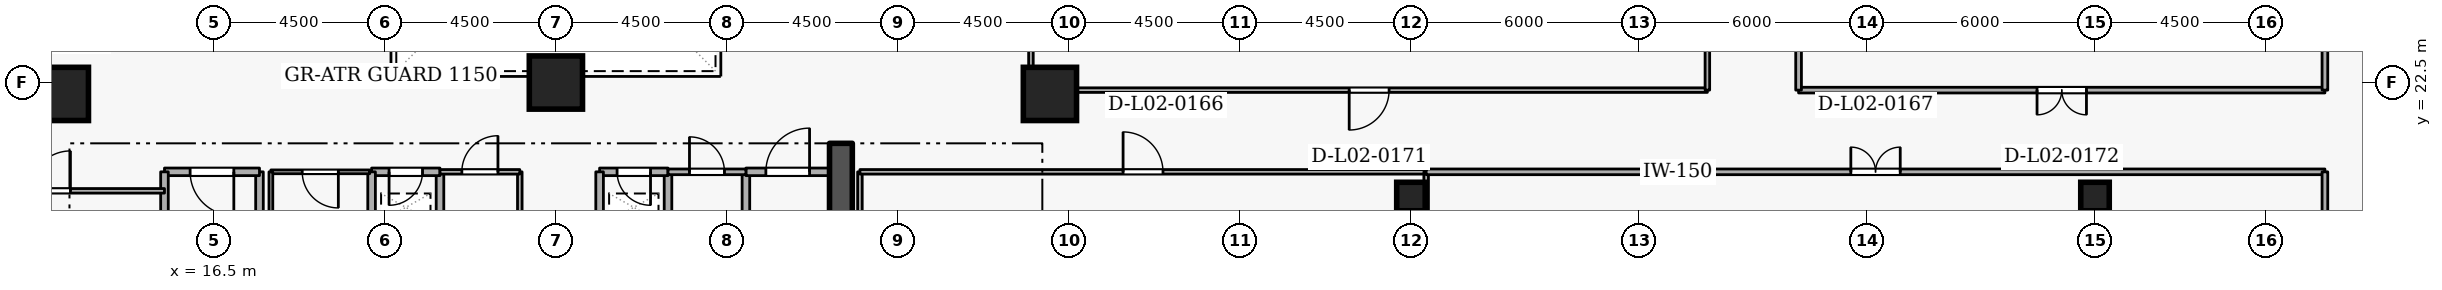
"""IFC4 building model, lengths in metres.
Left out: names, types, materials, properties, quantities, classifications, styles, units other than length and angle.
Written with IfcOpenShell. Run it as: python <this file> out.ifc"""

import sys

from ifc_helpers import new_model, si_unit, direction, frame, frame_2d, origin, origin_2d, place, context, subcontext, project, spatial, rectangle, extrude, element, fill, save


model = new_model("IFC4")
c1 = context("Model", 3, precision=1e-05, world=origin(), true_north=direction((0.0, 1.0)))
c2 = subcontext(c1, "Body", "Model", "MODEL_VIEW")
j1 = project(units=[si_unit("LENGTHUNIT", "METRE"), si_unit("PLANEANGLEUNIT", "RADIAN")], contexts=[c1])
p1 = place(None, origin())
s1 = spatial("IfcSite", under=j1, at=p1, CompositionType="ELEMENT")
p2 = place(p1, origin())
s2 = spatial("IfcBuilding", under=s1, at=p2, CompositionType="ELEMENT")
p3 = place(p2, frame((0.0, 0.0, 9.6)))
s3 = spatial("IfcBuildingStorey", under=s2, at=p3, CompositionType="ELEMENT", Elevation=9.6)
p4 = place(p3, frame((33.0, 15.2, 0.0), z_axis=(0.0, 0.0, 1.0), x_axis=(0.0, 1.0, 0.0)))
e1 = element("IfcWall", 1, at=p4, inside=s3, PredefinedType="SHEAR", context=c2, shape_type="SweptSolid", body=[
    extrude(rectangle(XDim=5.7, YDim=0.6, at=frame_2d((2.85, 0.0))), origin(), (0.0, 0.0, 1.0), 4.5),
])
for number, where, z_axis, x_axis in (
    (2, (12.5, 22.2, 0.0), (0.0, 0.0, 1.0), (1.0, 0.0, 0.0)),
    (3, (38.5, 22.2, 0.0), (0.0, 0.0, 1.0), (1.0, 0.0, 0.0)),
    (4, (25.5, 22.5, 0.0), (0.0, 0.0, 1.0), (1.0, 0.0, 0.0)),
):
    element("IfcColumn", number, at=place(p3, frame(where, z_axis=z_axis, x_axis=x_axis)), inside=s3, PredefinedType="COLUMN", context=c2, shape_type="SweptSolid", body=[
        extrude(rectangle(XDim=1.4, YDim=1.4, at=origin_2d()), origin(), (0.0, 0.0, 1.0), 4.5),
    ])
for number, where, z_axis, x_axis in (
    (5, (48.0, 19.5, 0.0), (0.0, 0.0, 1.0), (1.0, 0.0, 0.0)),
    (6, (66.0, 19.5, 0.0), (0.0, 0.0, 1.0), (1.0, 0.0, 0.0)),
):
    element("IfcColumn", number, at=place(p3, frame(where, z_axis=z_axis, x_axis=x_axis)), inside=s3, PredefinedType="COLUMN", context=c2, shape_type="SweptSolid", body=[
        extrude(rectangle(XDim=0.75, YDim=0.75, at=origin_2d()), origin(), (0.0, 0.0, 1.0), 4.5),
    ])
p5 = place(p3, frame((17.7, 18.4, 0.0), z_axis=(0.0, 0.0, 1.0), x_axis=(0.0, 1.0, 0.0)))
e7 = element("IfcWall", 7, at=p5, inside=s3, PredefinedType="STANDARD", context=c2, shape_type="SweptSolid", body=[
    extrude(rectangle(XDim=1.75, YDim=0.2, at=frame_2d((0.875, 0.0))), origin(), (0.0, 0.0, 1.0), 3.365),
])
p6 = place(p3, frame((17.7, 20.15, 0.0), z_axis=(0.0, 0.0, 1.0), x_axis=(-1.0, 0.0, 0.0)))
e8 = element("IfcWall", 8, at=p6, inside=s3, PredefinedType="STANDARD", context=c2, shape_type="SweptSolid", body=[
    extrude(rectangle(XDim=2.5, YDim=0.2, at=frame_2d((1.25, 0.0))), origin(), (0.0, 0.0, 1.0), 4.16),
])
p7 = place(p6, frame((0.675, 0.0, 0.0)))
e9 = element("IfcOpeningElement", 9, at=p7, cuts=e8, PredefinedType="OPENING", context=c2, shape_type="SweptSolid", body=[
    extrude(rectangle(XDim=1.15, YDim=2.1, at=frame_2d((0.575, 1.05))), frame((0.0, 0.11, 0.0), z_axis=(0.0, -1.0, 0.0), x_axis=(1.0, 0.0, 0.0)), (0.0, 0.0, 1.0), 0.22),
])
p8 = place(p3, frame((15.2, 20.15, 0.0), z_axis=(0.0, 0.0, 1.0), x_axis=(0.0, -1.0, 0.0)))
e10 = element("IfcWall", 10, at=p8, inside=s3, PredefinedType="STANDARD", context=c2, shape_type="SweptSolid", body=[
    extrude(rectangle(XDim=5.15, YDim=0.2, at=frame_2d((2.575, 0.0))), origin(), (0.0, 0.0, 1.0), 4.16),
])
p9 = place(p3, frame((28.45, 18.65, 0.0), z_axis=(0.0, 0.0, 1.0), x_axis=(0.0, 1.0, 0.0)))
e11 = element("IfcWall", 11, at=p9, inside=s3, PredefinedType="STANDARD", context=c2, shape_type="SweptSolid", body=[
    extrude(rectangle(XDim=1.5, YDim=0.2, at=frame_2d((0.75, 0.0))), origin(), (0.0, 0.0, 1.0), 4.16),
])
p10 = place(p3, frame((28.45, 20.15, 0.0), z_axis=(0.0, 0.0, 1.0), x_axis=(-1.0, 0.0, 0.0)))
e12 = element("IfcWall", 12, at=p10, inside=s3, PredefinedType="STANDARD", context=c2, shape_type="SweptSolid", body=[
    extrude(rectangle(XDim=1.8, YDim=0.2, at=frame_2d((0.9, 0.0))), origin(), (0.0, 0.0, 1.0), 4.16),
])
p11 = place(p10, frame((0.46, 0.0, 0.0)))
e13 = element("IfcOpeningElement", 13, at=p11, cuts=e12, PredefinedType="OPENING", context=c2, shape_type="SweptSolid", body=[
    extrude(rectangle(XDim=0.88, YDim=2.04, at=frame_2d((0.44, 1.02))), frame((0.0, 0.11, 0.0), z_axis=(0.0, -1.0, 0.0), x_axis=(1.0, 0.0, 0.0)), (0.0, 0.0, 1.0), 0.22),
])
for number, where, z_axis, x_axis in (
    (14, (26.65, 20.15, 0.0), (0.0, 0.0, 1.0), (0.0, -1.0, 0.0)),
    (15, (22.45, 18.65, 0.0), (0.0, 0.0, 1.0), (0.0, 1.0, 0.0)),
):
    element("IfcWall", number, at=place(p3, frame(where, z_axis=z_axis, x_axis=x_axis)), inside=s3, PredefinedType="STANDARD", context=c2, shape_type="SweptSolid", body=[
        extrude(rectangle(XDim=1.5, YDim=0.2, at=frame_2d((0.75, 0.0))), origin(), (0.0, 0.0, 1.0), 4.16),
    ])
p12 = place(p3, frame((22.45, 20.15, 0.0), z_axis=(0.0, 0.0, 1.0), x_axis=(-1.0, 0.0, 0.0)))
e16 = element("IfcWall", 16, at=p12, inside=s3, PredefinedType="STANDARD", context=c2, shape_type="SweptSolid", body=[
    extrude(rectangle(XDim=1.8, YDim=0.2, at=frame_2d((0.9, 0.0))), origin(), (0.0, 0.0, 1.0), 4.16),
])
p13 = place(p12, frame((0.46, 0.0, 0.0)))
e17 = element("IfcOpeningElement", 17, at=p13, cuts=e16, PredefinedType="OPENING", context=c2, shape_type="SweptSolid", body=[
    extrude(rectangle(XDim=0.88, YDim=2.04, at=frame_2d((0.44, 1.02))), frame((0.0, 0.11, 0.0), z_axis=(0.0, -1.0, 0.0), x_axis=(1.0, 0.0, 0.0)), (0.0, 0.0, 1.0), 0.22),
])
for number, where, z_axis, x_axis in (
    (18, (20.65, 20.15, 0.0), (0.0, 0.0, 1.0), (0.0, -1.0, 0.0)),
    (19, (30.5, 18.65, 0.0), (0.0, 0.0, 1.0), (0.0, 1.0, 0.0)),
):
    element("IfcWall", number, at=place(p3, frame(where, z_axis=z_axis, x_axis=x_axis)), inside=s3, PredefinedType="STANDARD", context=c2, shape_type="SweptSolid", body=[
        extrude(rectangle(XDim=1.5, YDim=0.2, at=frame_2d((0.75, 0.0))), origin(), (0.0, 0.0, 1.0), 4.16),
    ])
p14 = place(p3, frame((30.5, 20.15, 0.0), z_axis=(0.0, 0.0, 1.0), x_axis=(1.0, 0.0, 0.0)))
e20 = element("IfcWall", 20, at=p14, inside=s3, PredefinedType="STANDARD", context=c2, shape_type="SweptSolid", body=[
    extrude(rectangle(XDim=2.2, YDim=0.2, at=frame_2d((1.1, 0.0))), origin(), (0.0, 0.0, 1.0), 4.16),
])
p15 = place(p14, frame((0.525, 0.0, 0.0)))
e21 = element("IfcOpeningElement", 21, at=p15, cuts=e20, PredefinedType="OPENING", context=c2, shape_type="SweptSolid", body=[
    extrude(rectangle(XDim=1.15, YDim=2.1, at=frame_2d((0.575, 1.05))), frame((0.0, 0.11, 0.0), z_axis=(0.0, -1.0, 0.0), x_axis=(1.0, 0.0, 0.0)), (0.0, 0.0, 1.0), 0.22),
])
p16 = place(p3, frame((20.6, 20.15, 0.0), z_axis=(0.0, 0.0, 1.0), x_axis=(-1.0, 0.0, 0.0)))
e22 = element("IfcWall", 22, at=p16, inside=s3, PredefinedType="PARTITIONING", context=c2, shape_type="SweptSolid", body=[
    extrude(rectangle(XDim=2.6, YDim=0.1, at=frame_2d((1.3, 0.0))), origin(), (0.0, 0.0, 1.0), 4.16),
])
p17 = place(p16, frame((0.825, 0.0, 0.0)))
e23 = element("IfcOpeningElement", 23, at=p17, cuts=e22, PredefinedType="OPENING", context=c2, shape_type="SweptSolid", body=[
    extrude(rectangle(XDim=0.95, YDim=2.1, at=frame_2d((0.475, 1.05))), frame((0.0, 0.06, 0.0), z_axis=(0.0, -1.0, 0.0), x_axis=(1.0, 0.0, 0.0)), (0.0, 0.0, 1.0), 0.12),
])
p18 = place(p3, frame((18.0, 20.15, 0.0), z_axis=(0.0, 0.0, 1.0), x_axis=(0.0, -1.0, 0.0)))
e24 = element("IfcWall", 24, at=p18, inside=s3, PredefinedType="PARTITIONING", context=c2, shape_type="SweptSolid", body=[
    extrude(rectangle(XDim=1.5, YDim=0.1, at=frame_2d((0.75, 0.0))), origin(), (0.0, 0.0, 1.0), 3.365),
])
p19 = place(p3, frame((24.55, 20.15, 0.0), z_axis=(0.0, 0.0, 1.0), x_axis=(0.0, -1.0, 0.0)))
e25 = element("IfcWall", 25, at=p19, inside=s3, PredefinedType="PARTITIONING", context=c2, shape_type="SweptSolid", body=[
    extrude(rectangle(XDim=1.5, YDim=0.12, at=frame_2d((0.75, 0.0))), origin(), (0.0, 0.0, 1.0), 4.16),
])
p20 = place(p3, frame((22.45, 20.15, 0.0), z_axis=(0.0, 0.0, 1.0), x_axis=(1.0, 0.0, 0.0)))
e26 = element("IfcWall", 26, at=p20, inside=s3, PredefinedType="PARTITIONING", context=c2, shape_type="SweptSolid", body=[
    extrude(rectangle(XDim=2.1, YDim=0.12, at=frame_2d((1.05, 0.0))), origin(), (0.0, 0.0, 1.0), 4.16),
])
p21 = place(p20, frame((0.575, 0.0, 0.0)))
e27 = element("IfcOpeningElement", 27, at=p21, cuts=e26, PredefinedType="OPENING", context=c2, shape_type="SweptSolid", body=[
    extrude(rectangle(XDim=0.95, YDim=2.1, at=frame_2d((0.475, 1.05))), frame((0.0, 0.07, 0.0), z_axis=(0.0, -1.0, 0.0), x_axis=(1.0, 0.0, 0.0)), (0.0, 0.0, 1.0), 0.14),
])
p22 = place(p3, frame((28.45, 20.15, 0.0), z_axis=(0.0, 0.0, 1.0), x_axis=(1.0, 0.0, 0.0)))
e28 = element("IfcWall", 28, at=p22, inside=s3, PredefinedType="PARTITIONING", context=c2, shape_type="SweptSolid", body=[
    extrude(rectangle(XDim=2.05, YDim=0.15, at=frame_2d((1.025, 0.0))), origin(), (0.0, 0.0, 1.0), 4.16),
])
p23 = place(p22, frame((0.565, 0.0, 0.0)))
e29 = element("IfcOpeningElement", 29, at=p23, cuts=e28, PredefinedType="OPENING", context=c2, shape_type="SweptSolid", body=[
    extrude(rectangle(XDim=0.92, YDim=2.08, at=frame_2d((0.46, 1.04))), frame((0.0, 0.085, 0.0), z_axis=(0.0, -1.0, 0.0), x_axis=(1.0, 0.0, 0.0)), (0.0, 0.0, 1.0), 0.17),
])
p24 = place(p3, frame((9.2, 19.65, 0.0), z_axis=(0.0, 0.0, 1.0), x_axis=(1.0, 0.0, 0.0)))
e30 = element("IfcWall", 30, at=p24, inside=s3, PredefinedType="PARTITIONING", context=c2, shape_type="SweptSolid", body=[
    extrude(rectangle(XDim=6.0, YDim=0.12, at=frame_2d((3.0, 0.0))), origin(), (0.0, 0.0, 1.0), 4.16),
])
p25 = place(p24, frame((2.475, 0.0, 0.0)))
e31 = element("IfcOpeningElement", 31, at=p25, cuts=e30, PredefinedType="OPENING", context=c2, shape_type="SweptSolid", body=[
    extrude(rectangle(XDim=1.05, YDim=2.1, at=frame_2d((0.525, 1.05))), frame((0.0, 0.07, 0.0), z_axis=(0.0, -1.0, 0.0), x_axis=(1.0, 0.0, 0.0)), (0.0, 0.0, 1.0), 0.14),
])
p26 = place(p3, frame((33.5, 17.648, 0.0), z_axis=(0.0, 0.0, 1.0), x_axis=(0.0, 1.0, 0.0)))
e32 = element("IfcWall", 32, at=p26, inside=s3, PredefinedType="PARTITIONING", context=c2, shape_type="SweptSolid", body=[
    extrude(rectangle(XDim=2.502, YDim=0.12, at=frame_2d((1.251, 0.0))), origin(), (0.0, 0.0, 1.0), 4.16),
])
p27 = place(p3, frame((33.5, 20.15, 0.0), z_axis=(0.0, 0.0, 1.0), x_axis=(1.0, 0.0, 0.0)))
e33 = element("IfcWall", 33, at=p27, inside=s3, PredefinedType="PARTITIONING", context=c2, shape_type="SweptSolid", body=[
    extrude(rectangle(XDim=14.9, YDim=0.12, at=frame_2d((7.45, 0.0))), origin(), (0.0, 0.0, 1.0), 4.16),
])
p28 = place(p27, frame((6.925, 0.0, 0.0)))
e34 = element("IfcOpeningElement", 34, at=p28, cuts=e33, PredefinedType="OPENING", context=c2, shape_type="SweptSolid", body=[
    extrude(rectangle(XDim=1.05, YDim=2.1, at=frame_2d((0.525, 1.05))), frame((0.0, 0.07, 0.0), z_axis=(0.0, -1.0, 0.0), x_axis=(1.0, 0.0, 0.0)), (0.0, 0.0, 1.0), 0.14),
])
p29 = place(p3, frame((48.4, 20.15, 0.0), z_axis=(0.0, 0.0, 1.0), x_axis=(0.0, -1.0, 0.0)))
e35 = element("IfcWall", 35, at=p29, inside=s3, PredefinedType="PARTITIONING", context=c2, shape_type="SweptSolid", body=[
    extrude(rectangle(XDim=12.33, YDim=0.12, at=frame_2d((6.165, 0.0))), origin(), (0.0, 0.0, 1.0), 4.16),
])
p30 = place(p3, frame((48.4, 20.15, 0.0), z_axis=(0.0, 0.0, 1.0), x_axis=(1.0, 0.0, 0.0)))
e36 = element("IfcWall", 36, at=p30, inside=s3, PredefinedType="PARTITIONING", context=c2, shape_type="SweptSolid", body=[
    extrude(rectangle(XDim=23.65, YDim=0.15, at=frame_2d((11.825, 0.0))), origin(), (0.0, 0.0, 1.0), 4.16),
])
p31 = place(p30, frame((11.175, 0.0, 0.0)))
e37 = element("IfcOpeningElement", 37, at=p31, cuts=e36, PredefinedType="OPENING", context=c2, shape_type="SweptSolid", body=[
    extrude(rectangle(XDim=1.3, YDim=2.12, at=frame_2d((0.65, 1.06))), frame((0.0, 0.085, 0.0), z_axis=(0.0, -1.0, 0.0), x_axis=(1.0, 0.0, 0.0)), (0.0, 0.0, 1.0), 0.17),
])
p32 = place(p3, frame((72.05, 20.15, 0.0), z_axis=(0.0, 0.0, 1.0), x_axis=(0.0, -1.0, 0.0)))
e38 = element("IfcWall", 38, at=p32, inside=s3, PredefinedType="PARTITIONING", context=c2, shape_type="SweptSolid", body=[
    extrude(rectangle(XDim=5.35, YDim=0.15, at=frame_2d((2.675, 0.0))), origin(), (0.0, 0.0, 1.0), 4.16),
])
p33 = place(p3, frame((55.8, 22.3, 0.0), z_axis=(0.0, 0.0, 1.0), x_axis=(-1.0, 0.0, 0.0)))
e39 = element("IfcWall", 39, at=p33, inside=s3, PredefinedType="PARTITIONING", context=c2, shape_type="SweptSolid", body=[
    extrude(rectangle(XDim=17.8, YDim=0.12, at=frame_2d((8.9, 0.0))), origin(), (0.0, 0.0, 1.0), 4.16),
])
p34 = place(p33, frame((8.375, 0.0, 0.0)))
e40 = element("IfcOpeningElement", 40, at=p34, cuts=e39, PredefinedType="OPENING", context=c2, shape_type="SweptSolid", body=[
    extrude(rectangle(XDim=1.05, YDim=2.1, at=frame_2d((0.525, 1.05))), frame((0.0, 0.07, 0.0), z_axis=(0.0, -1.0, 0.0), x_axis=(1.0, 0.0, 0.0)), (0.0, 0.0, 1.0), 0.14),
])
for number, where, z_axis, x_axis in (
    (41, (38.0, 22.3, 0.0), (0.0, 0.0, 1.0), (0.0, 1.0, 0.0)),
    (42, (55.8, 32.28, 0.0), (0.0, 0.0, 1.0), (0.0, -1.0, 0.0)),
):
    element("IfcWall", number, at=place(p3, frame(where, z_axis=z_axis, x_axis=x_axis)), inside=s3, PredefinedType="PARTITIONING", context=c2, shape_type="SweptSolid", body=[
        extrude(rectangle(XDim=9.98, YDim=0.12, at=frame_2d((4.99, 0.0))), origin(), (0.0, 0.0, 1.0), 4.16),
    ])
p35 = place(p3, frame((72.05, 22.3, 0.0), z_axis=(0.0, 0.0, 1.0), x_axis=(-1.0, 0.0, 0.0)))
e43 = element("IfcWall", 43, at=p35, inside=s3, PredefinedType="PARTITIONING", context=c2, shape_type="SweptSolid", body=[
    extrude(rectangle(XDim=13.85, YDim=0.15, at=frame_2d((6.925, 0.0))), origin(), (0.0, 0.0, 1.0), 4.16),
])
p36 = place(p35, frame((6.275, 0.0, 0.0)))
e44 = element("IfcOpeningElement", 44, at=p36, cuts=e43, PredefinedType="OPENING", context=c2, shape_type="SweptSolid", body=[
    extrude(rectangle(XDim=1.3, YDim=2.12, at=frame_2d((0.65, 1.06))), frame((0.0, 0.085, 0.0), z_axis=(0.0, -1.0, 0.0), x_axis=(1.0, 0.0, 0.0)), (0.0, 0.0, 1.0), 0.17),
])
for number, where, z_axis, x_axis in (
    (45, (58.2, 22.3, 0.0), (0.0, 0.0, 1.0), (0.0, 1.0, 0.0)),
    (46, (72.05, 32.28, 0.0), (0.0, 0.0, 1.0), (0.0, -1.0, 0.0)),
):
    element("IfcWall", number, at=place(p3, frame(where, z_axis=z_axis, x_axis=x_axis)), inside=s3, PredefinedType="PARTITIONING", context=c2, shape_type="SweptSolid", body=[
        extrude(rectangle(XDim=9.98, YDim=0.15, at=frame_2d((4.99, 0.0))), origin(), (0.0, 0.0, 1.0), 4.16),
    ])
p37 = place(p7, origin())
e47 = element("IfcDoor", 47, at=p37, inside=s3, OperationType="SINGLE_SWING_LEFT", PredefinedType="DOOR", context=c2, shape_type="SweptSolid", body=[
    extrude(rectangle(XDim=1.15, YDim=2.1, at=frame_2d((0.575, 1.05))), frame((0.0, 0.025, 0.0), z_axis=(0.0, -1.0, 0.0), x_axis=(1.0, 0.0, 0.0)), (0.0, 0.0, 1.0), 0.05),
])
fill(e9, e47)
p38 = place(p11, origin())
e48 = element("IfcDoor", 48, at=p38, inside=s3, OperationType="SINGLE_SWING_LEFT", PredefinedType="DOOR", context=c2, shape_type="SweptSolid", body=[
    extrude(rectangle(XDim=0.88, YDim=2.04, at=frame_2d((0.44, 1.02))), frame((0.0, 0.025, 0.0), z_axis=(0.0, -1.0, 0.0), x_axis=(1.0, 0.0, 0.0)), (0.0, 0.0, 1.0), 0.05),
])
fill(e13, e48)
p39 = place(p13, origin())
e49 = element("IfcDoor", 49, at=p39, inside=s3, OperationType="SINGLE_SWING_RIGHT", PredefinedType="DOOR", context=c2, shape_type="SweptSolid", body=[
    extrude(rectangle(XDim=0.88, YDim=2.04, at=frame_2d((0.44, 1.02))), frame((0.0, 0.025, 0.0), z_axis=(0.0, -1.0, 0.0), x_axis=(1.0, 0.0, 0.0)), (0.0, 0.0, 1.0), 0.05),
])
fill(e17, e49)
p40 = place(p17, origin())
e50 = element("IfcDoor", 50, at=p40, inside=s3, OperationType="SINGLE_SWING_LEFT", PredefinedType="DOOR", context=c2, shape_type="SweptSolid", body=[
    extrude(rectangle(XDim=0.95, YDim=2.1, at=frame_2d((0.475, 1.05))), frame((0.0, 0.025, 0.0), z_axis=(0.0, -1.0, 0.0), x_axis=(1.0, 0.0, 0.0)), (0.0, 0.0, 1.0), 0.05),
])
fill(e23, e50)
p41 = place(p21, origin())
e51 = element("IfcDoor", 51, at=p41, inside=s3, OperationType="SINGLE_SWING_RIGHT", PredefinedType="DOOR", context=c2, shape_type="SweptSolid", body=[
    extrude(rectangle(XDim=0.95, YDim=2.1, at=frame_2d((0.475, 1.05))), frame((0.0, 0.025, 0.0), z_axis=(0.0, -1.0, 0.0), x_axis=(1.0, 0.0, 0.0)), (0.0, 0.0, 1.0), 0.05),
])
fill(e27, e51)
p42 = place(p23, origin())
e52 = element("IfcDoor", 52, at=p42, inside=s3, OperationType="SINGLE_SWING_LEFT", PredefinedType="DOOR", context=c2, shape_type="SweptSolid", body=[
    extrude(rectangle(XDim=0.92, YDim=2.08, at=frame_2d((0.46, 1.04))), frame((0.0, 0.025, 0.0), z_axis=(0.0, -1.0, 0.0), x_axis=(1.0, 0.0, 0.0)), (0.0, 0.0, 1.0), 0.05),
])
fill(e29, e52)
p43 = place(p15, origin())
e53 = element("IfcDoor", 53, at=p43, inside=s3, OperationType="SINGLE_SWING_RIGHT", PredefinedType="DOOR", context=c2, shape_type="SweptSolid", body=[
    extrude(rectangle(XDim=1.15, YDim=2.1, at=frame_2d((0.575, 1.05))), frame((0.0, 0.025, 0.0), z_axis=(0.0, -1.0, 0.0), x_axis=(1.0, 0.0, 0.0)), (0.0, 0.0, 1.0), 0.05),
])
fill(e21, e53)
p44 = place(p25, origin())
e54 = element("IfcDoor", 54, at=p44, inside=s3, OperationType="SINGLE_SWING_RIGHT", PredefinedType="DOOR", context=c2, shape_type="SweptSolid", body=[
    extrude(rectangle(XDim=1.05, YDim=2.1, at=frame_2d((0.525, 1.05))), frame((0.0, 0.025, 0.0), z_axis=(0.0, -1.0, 0.0), x_axis=(1.0, 0.0, 0.0)), (0.0, 0.0, 1.0), 0.05),
])
fill(e31, e54)
p45 = place(p28, origin())
e55 = element("IfcDoor", 55, at=p45, inside=s3, OperationType="SINGLE_SWING_LEFT", PredefinedType="DOOR", context=c2, shape_type="SweptSolid", body=[
    extrude(rectangle(XDim=1.05, YDim=2.1, at=frame_2d((0.525, 1.05))), frame((0.0, 0.025, 0.0), z_axis=(0.0, -1.0, 0.0), x_axis=(1.0, 0.0, 0.0)), (0.0, 0.0, 1.0), 0.05),
])
fill(e34, e55)
p46 = place(p31, origin())
e56 = element("IfcDoor", 56, at=p46, inside=s3, OperationType="DOUBLE_DOOR_SINGLE_SWING", PredefinedType="DOOR", context=c2, shape_type="SweptSolid", body=[
    extrude(rectangle(XDim=1.3, YDim=2.12, at=frame_2d((0.65, 1.06))), frame((0.0, 0.025, 0.0), z_axis=(0.0, -1.0, 0.0), x_axis=(1.0, 0.0, 0.0)), (0.0, 0.0, 1.0), 0.05),
])
fill(e37, e56)
p47 = place(p34, origin())
e57 = element("IfcDoor", 57, at=p47, inside=s3, OperationType="SINGLE_SWING_RIGHT", PredefinedType="DOOR", context=c2, shape_type="SweptSolid", body=[
    extrude(rectangle(XDim=1.05, YDim=2.1, at=frame_2d((0.525, 1.05))), frame((0.0, 0.025, 0.0), z_axis=(0.0, -1.0, 0.0), x_axis=(1.0, 0.0, 0.0)), (0.0, 0.0, 1.0), 0.05),
])
fill(e40, e57)
p48 = place(p36, origin())
e58 = element("IfcDoor", 58, at=p48, inside=s3, OperationType="DOUBLE_DOOR_SINGLE_SWING", PredefinedType="DOOR", context=c2, shape_type="SweptSolid", body=[
    extrude(rectangle(XDim=1.3, YDim=2.12, at=frame_2d((0.65, 1.06))), frame((0.0, 0.025, 0.0), z_axis=(0.0, -1.0, 0.0), x_axis=(1.0, 0.0, 0.0)), (0.0, 0.0, 1.0), 0.05),
])
fill(e44, e58)
save(model, sys.argv[1])
